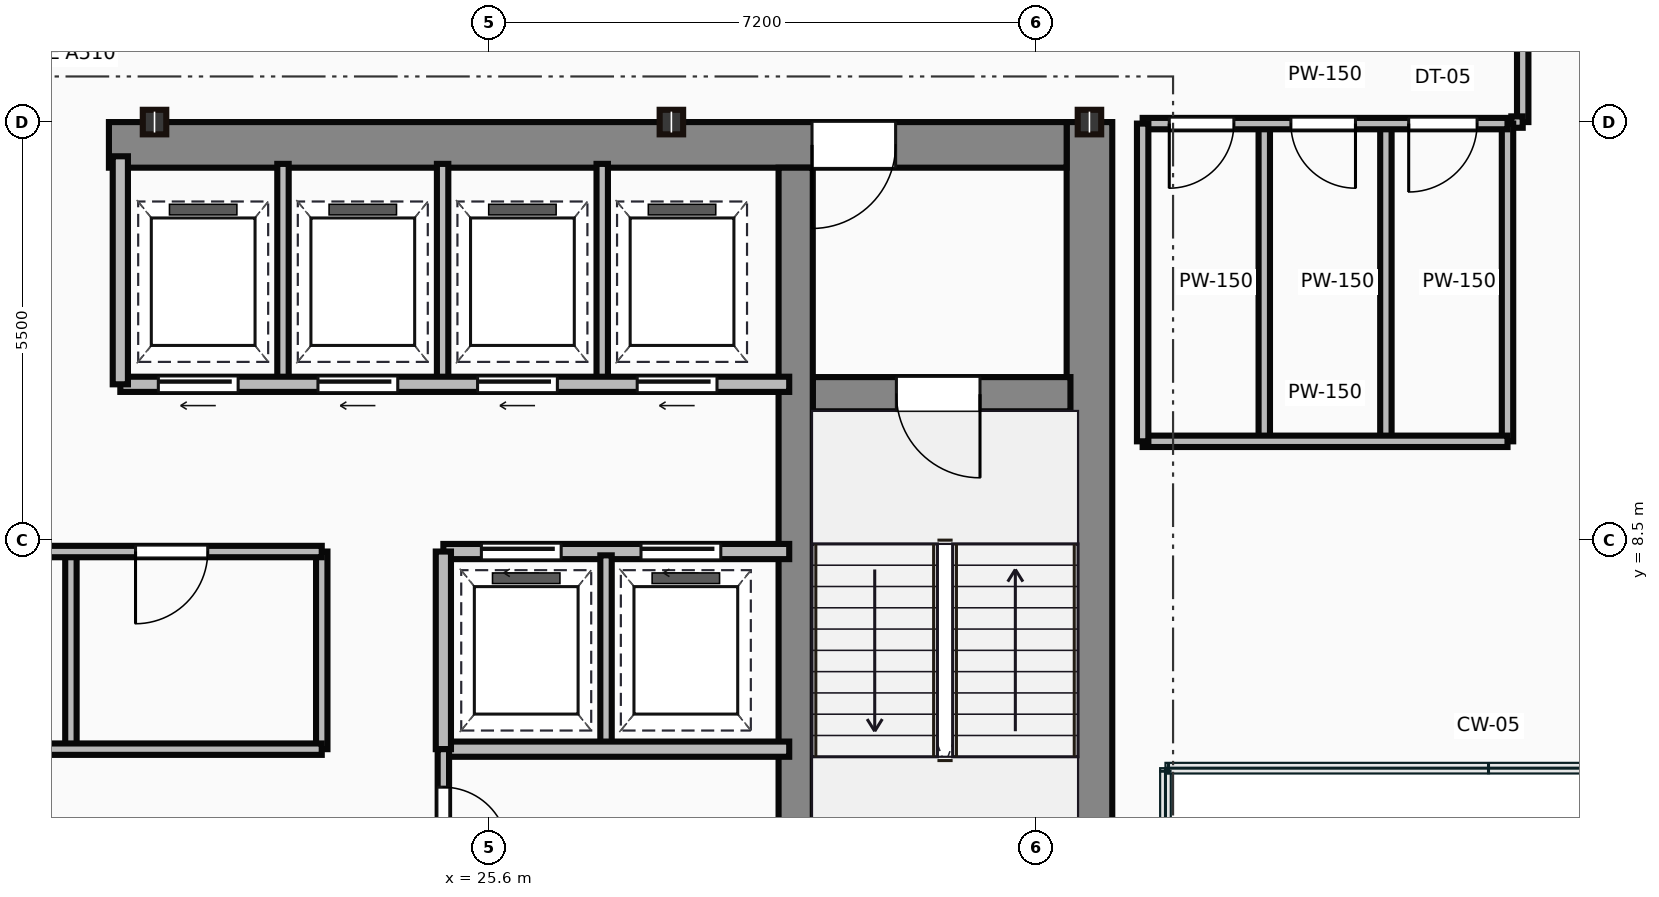
"""IFC4 building model, lengths in metres.
Left out: names, types, materials, properties, quantities, classifications, styles, units other than length and angle.
Written with IfcOpenShell. Run it as: python <this file> out.ifc"""

import sys

from ifc_helpers import new_model, si_unit, direction, frame, frame_2d, origin, origin_2d, place, context, subcontext, project, spatial, rectangle, i_section, extrude, source, transform, mapped, element, fill, save


model = new_model("IFC4")
c1 = context("Model", 3, precision=1e-05, world=origin(), true_north=direction((0.0, 1.0)))
c2 = subcontext(c1, "Body", "Model", "MODEL_VIEW")
j1 = project(units=[si_unit("LENGTHUNIT", "METRE"), si_unit("PLANEANGLEUNIT", "RADIAN")], contexts=[c1])
p1 = place(None, origin())
s1 = spatial("IfcSite", under=j1, at=p1, CompositionType="ELEMENT")
p2 = place(p1, origin())
s2 = spatial("IfcBuilding", under=s1, at=p2, CompositionType="ELEMENT")
p3 = place(p2, frame((0.0, 0.0, 244.2)))
s3 = spatial("IfcBuildingStorey", under=s2, at=p3, CompositionType="ELEMENT", Elevation=244.2)
m1 = source(origin(), c2, "Body", "SweptSolid", [
    extrude(rectangle(XDim=13.1, YDim=0.6, at=frame_2d((6.55, 0.0))), origin(), (0.0, 0.0, 1.0), 3.65),
])
p4 = place(p3, frame((33.5, 0.9, 0.0), z_axis=(0.0, 0.0, 1.0), x_axis=(0.0, 1.0, 0.0)))
e1 = element("IfcWall", 1, at=p4, inside=s3, PredefinedType="SHEAR", context=c2, shape_type="MappedRepresentation", body=[
    mapped(m1, transform((0.0, 0.0, 0.0))),
])
m2 = source(origin(), c2, "Body", "SweptSolid", [
    extrude(rectangle(XDim=12.6, YDim=0.6, at=frame_2d((6.3, 0.0))), origin(), (0.0, 0.0, 1.0), 3.65),
])
p5 = place(p3, frame((20.6, 13.7, 0.0), z_axis=(0.0, 0.0, 1.0), x_axis=(1.0, 0.0, 0.0)))
e2 = element("IfcWall", 2, at=p5, inside=s3, PredefinedType="SHEAR", context=c2, shape_type="MappedRepresentation", body=[
    mapped(m2, transform((0.0, 0.0, 0.0))),
])
p6 = place(p5, frame((9.25, 0.0, 0.0)))
e3 = element("IfcOpeningElement", 3, at=p6, cuts=e2, PredefinedType="OPENING", context=c2, shape_type="SweptSolid", body=[
    extrude(rectangle(XDim=1.1, YDim=2.15, at=frame_2d((0.55, 1.075))), frame((0.0, 0.31, 0.0), z_axis=(0.0, -1.0, 0.0), x_axis=(1.0, 0.0, 0.0)), (0.0, 0.0, 1.0), 0.62),
])
m3 = source(origin(), c2, "Body", "SweptSolid", [
    extrude(rectangle(XDim=12.5, YDim=0.45, at=frame_2d((6.25, 0.0))), origin(), (0.0, 0.0, 1.0), 3.65),
])
p7 = place(p3, frame((29.635, 0.9, 0.0), z_axis=(0.0, 0.0, 1.0), x_axis=(0.0, 1.0, 0.0)))
e4 = element("IfcWall", 4, at=p7, inside=s3, PredefinedType="SHEAR", context=c2, shape_type="MappedRepresentation", body=[
    mapped(m3, transform((0.0, 0.0, 0.0))),
])
m4 = source(origin(), c2, "Body", "SweptSolid", [
    extrude(rectangle(XDim=3.39, YDim=0.45, at=frame_2d((1.695, 0.0))), origin(), (0.0, 0.0, 1.0), 3.65),
])
p8 = place(p3, frame((29.86, 10.42, 0.0), z_axis=(0.0, 0.0, 1.0), x_axis=(1.0, 0.0, 0.0)))
e5 = element("IfcWall", 5, at=p8, inside=s3, PredefinedType="SHEAR", context=c2, shape_type="MappedRepresentation", body=[
    mapped(m4, transform((0.0, 0.0, 0.0))),
])
p9 = place(p8, frame((1.1, 0.0, 0.0)))
e6 = element("IfcOpeningElement", 6, at=p9, cuts=e5, PredefinedType="OPENING", context=c2, shape_type="SweptSolid", body=[
    extrude(rectangle(XDim=1.1, YDim=2.15, at=frame_2d((0.55, 1.075))), frame((0.0, 0.235, 0.0), z_axis=(0.0, -1.0, 0.0), x_axis=(1.0, 0.0, 0.0)), (0.0, 0.0, 1.0), 0.47),
])
m5 = source(origin(), c2, "Body", "SweptSolid", [
    extrude(i_section(OverallWidth=0.309, OverallDepth=0.323, WebThickness=0.014, FlangeThickness=0.023, at=origin_2d()), origin(), (0.0, 0.0, 1.0), 3.65),
])
for number, where, z_axis, x_axis in (
    (7, (21.2, 14.0, 0.0), (0.0, 0.0, 1.0), (1.0, 0.0, 0.0)),
    (8, (28.0, 14.0, 0.0), (0.0, 0.0, 1.0), (1.0, 0.0, 0.0)),
    (9, (33.5, 14.0, 0.0), (0.0, 0.0, 1.0), (1.0, 0.0, 0.0)),
):
    element("IfcColumn", number, at=place(p3, frame(where, z_axis=z_axis, x_axis=x_axis)), inside=s3, PredefinedType="COLUMN", context=c2, shape_type="MappedRepresentation", body=[
        mapped(m5, transform((0.0, 0.0, 0.0))),
    ])
m6 = source(origin(), c2, "Body", "SweptSolid", [
    extrude(rectangle(XDim=11.85, YDim=0.15, at=frame_2d((5.925, 0.0))), origin(), (0.0, 0.0, 1.0), 3.4),
])
p10 = place(p3, frame((11.55, 5.75, 0.0), z_axis=(0.0, 0.0, 1.0), x_axis=(1.0, 0.0, 0.0)))
e10 = element("IfcWall", 10, at=p10, inside=s3, PredefinedType="PARTITIONING", context=c2, shape_type="MappedRepresentation", body=[
    mapped(m6, transform((0.0, 0.0, 0.0))),
])
p11 = place(p3, frame((11.55, 8.35, 0.0), z_axis=(0.0, 0.0, 1.0), x_axis=(1.0, 0.0, 0.0)))
e11 = element("IfcWall", 11, at=p11, inside=s3, PredefinedType="PARTITIONING", context=c2, shape_type="MappedRepresentation", body=[
    mapped(m6, transform((0.0, 0.0, 0.0))),
])
p12 = place(p11, frame((1.1, 0.0, 0.0)))
e12 = element("IfcOpeningElement", 12, at=p12, cuts=e11, PredefinedType="OPENING", context=c2, shape_type="SweptSolid", body=[
    extrude(rectangle(XDim=0.95, YDim=2.15, at=frame_2d((0.475, 1.075))), frame((0.0, 0.085, 0.0), z_axis=(0.0, -1.0, 0.0), x_axis=(1.0, 0.0, 0.0)), (0.0, 0.0, 1.0), 0.17),
])
p13 = place(p11, frame((9.4, 0.0, 0.0)))
e13 = element("IfcOpeningElement", 13, at=p13, cuts=e11, PredefinedType="OPENING", context=c2, shape_type="SweptSolid", body=[
    extrude(rectangle(XDim=0.95, YDim=2.15, at=frame_2d((0.475, 1.075))), frame((0.0, 0.085, 0.0), z_axis=(0.0, -1.0, 0.0), x_axis=(1.0, 0.0, 0.0)), (0.0, 0.0, 1.0), 0.17),
])
m7 = source(origin(), c2, "Body", "SweptSolid", [
    extrude(rectangle(XDim=2.6, YDim=0.15, at=frame_2d((1.3, 0.0))), origin(), (0.0, 0.0, 1.0), 3.4),
])
p14 = place(p3, frame((23.4, 5.75, 0.0), z_axis=(0.0, 0.0, 1.0), x_axis=(0.0, 1.0, 0.0)))
e14 = element("IfcWall", 14, at=p14, inside=s3, PredefinedType="PARTITIONING", context=c2, shape_type="MappedRepresentation", body=[
    mapped(m7, transform((0.0, 0.0, 0.0))),
])
m8 = source(origin(), c2, "Body", "SweptSolid", [
    extrude(rectangle(XDim=2.5, YDim=0.15, at=frame_2d((1.25, 0.0))), origin(), (0.0, 0.0, 1.0), 3.4),
])
p15 = place(p3, frame((20.1, 5.8, 0.0), z_axis=(0.0, 0.0, 1.0), x_axis=(0.0, 1.0, 0.0)))
e15 = element("IfcWall", 15, at=p15, inside=s3, PredefinedType="PARTITIONING", context=c2, shape_type="MappedRepresentation", body=[
    mapped(m8, transform((0.0, 0.0, 0.0))),
])
m9 = source(origin(), c2, "Body", "SweptSolid", [
    extrude(rectangle(XDim=8.8, YDim=0.2, at=frame_2d((4.4, 0.0))), origin(), (0.0, 0.0, 1.0), 3.4),
])
p16 = place(p3, frame((20.75, 10.55, 0.0), z_axis=(0.0, 0.0, 1.0), x_axis=(1.0, 0.0, 0.0)))
e16 = element("IfcWall", 16, at=p16, inside=s3, PredefinedType="PARTITIONING", context=c2, shape_type="MappedRepresentation", body=[
    mapped(m9, transform((0.0, 0.0, 0.0))),
])
p17 = place(p16, frame((0.5, 0.0, 0.0)))
e17 = element("IfcOpeningElement", 17, at=p17, cuts=e16, PredefinedType="OPENING", context=c2, shape_type="SweptSolid", body=[
    extrude(rectangle(XDim=1.05, YDim=2.15, at=frame_2d((0.525, 1.075))), frame((0.0, 0.11, 0.0), z_axis=(0.0, -1.0, 0.0), x_axis=(1.0, 0.0, 0.0)), (0.0, 0.0, 1.0), 0.22),
])
p18 = place(p16, frame((2.6, 0.0, 0.0)))
e18 = element("IfcOpeningElement", 18, at=p18, cuts=e16, PredefinedType="OPENING", context=c2, shape_type="SweptSolid", body=[
    extrude(rectangle(XDim=1.05, YDim=2.15, at=frame_2d((0.525, 1.075))), frame((0.0, 0.11, 0.0), z_axis=(0.0, -1.0, 0.0), x_axis=(1.0, 0.0, 0.0)), (0.0, 0.0, 1.0), 0.22),
])
p19 = place(p16, frame((4.7, 0.0, 0.0)))
e19 = element("IfcOpeningElement", 19, at=p19, cuts=e16, PredefinedType="OPENING", context=c2, shape_type="SweptSolid", body=[
    extrude(rectangle(XDim=1.05, YDim=2.15, at=frame_2d((0.525, 1.075))), frame((0.0, 0.11, 0.0), z_axis=(0.0, -1.0, 0.0), x_axis=(1.0, 0.0, 0.0)), (0.0, 0.0, 1.0), 0.22),
])
p20 = place(p16, frame((6.8, 0.0, 0.0)))
e20 = element("IfcOpeningElement", 20, at=p20, cuts=e16, PredefinedType="OPENING", context=c2, shape_type="SweptSolid", body=[
    extrude(rectangle(XDim=1.05, YDim=2.15, at=frame_2d((0.525, 1.075))), frame((0.0, 0.11, 0.0), z_axis=(0.0, -1.0, 0.0), x_axis=(1.0, 0.0, 0.0)), (0.0, 0.0, 1.0), 0.22),
])
m10 = source(origin(), c2, "Body", "SweptSolid", [
    extrude(rectangle(XDim=3.0, YDim=0.2, at=frame_2d((1.5, 0.0))), origin(), (0.0, 0.0, 1.0), 3.4),
])
p21 = place(p3, frame((20.75, 10.55, 0.0), z_axis=(0.0, 0.0, 1.0), x_axis=(0.0, 1.0, 0.0)))
e21 = element("IfcWall", 21, at=p21, inside=s3, PredefinedType="PARTITIONING", context=c2, shape_type="MappedRepresentation", body=[
    mapped(m10, transform((0.0, 0.0, 0.0))),
])
m11 = source(origin(), c2, "Body", "SweptSolid", [
    extrude(rectangle(XDim=2.85, YDim=0.15, at=frame_2d((1.425, 0.0))), origin(), (0.0, 0.0, 1.0), 3.4),
])
for number, where, z_axis, x_axis in (
    (22, (22.89, 10.6, 0.0), (0.0, 0.0, 1.0), (0.0, 1.0, 0.0)),
    (23, (24.99, 10.6, 0.0), (0.0, 0.0, 1.0), (0.0, 1.0, 0.0)),
    (24, (27.09, 10.6, 0.0), (0.0, 0.0, 1.0), (0.0, 1.0, 0.0)),
):
    element("IfcWall", number, at=place(p3, frame(where, z_axis=z_axis, x_axis=x_axis)), inside=s3, PredefinedType="PARTITIONING", context=c2, shape_type="MappedRepresentation", body=[
        mapped(m11, transform((0.0, 0.0, 0.0))),
    ])
m12 = source(origin(), c2, "Body", "SweptSolid", [
    extrude(rectangle(XDim=4.55, YDim=0.2, at=frame_2d((2.275, 0.0))), origin(), (0.0, 0.0, 1.0), 3.4),
])
p22 = place(p3, frame((25.0, 8.35, 0.0), z_axis=(0.0, 0.0, 1.0), x_axis=(1.0, 0.0, 0.0)))
e25 = element("IfcWall", 25, at=p22, inside=s3, PredefinedType="PARTITIONING", context=c2, shape_type="MappedRepresentation", body=[
    mapped(m12, transform((0.0, 0.0, 0.0))),
])
p23 = place(p22, frame((0.5, 0.0, 0.0)))
e26 = element("IfcOpeningElement", 26, at=p23, cuts=e25, PredefinedType="OPENING", context=c2, shape_type="SweptSolid", body=[
    extrude(rectangle(XDim=1.05, YDim=2.15, at=frame_2d((0.525, 1.075))), frame((0.0, 0.11, 0.0), z_axis=(0.0, -1.0, 0.0), x_axis=(1.0, 0.0, 0.0)), (0.0, 0.0, 1.0), 0.22),
])
p24 = place(p22, frame((2.6, 0.0, 0.0)))
e27 = element("IfcOpeningElement", 27, at=p24, cuts=e25, PredefinedType="OPENING", context=c2, shape_type="SweptSolid", body=[
    extrude(rectangle(XDim=1.05, YDim=2.15, at=frame_2d((0.525, 1.075))), frame((0.0, 0.11, 0.0), z_axis=(0.0, -1.0, 0.0), x_axis=(1.0, 0.0, 0.0)), (0.0, 0.0, 1.0), 0.22),
])
p25 = place(p3, frame((25.0, 5.75, 0.0), z_axis=(0.0, 0.0, 1.0), x_axis=(1.0, 0.0, 0.0)))
e28 = element("IfcWall", 28, at=p25, inside=s3, PredefinedType="PARTITIONING", context=c2, shape_type="MappedRepresentation", body=[
    mapped(m12, transform((0.0, 0.0, 0.0))),
])
m13 = source(origin(), c2, "Body", "SweptSolid", [
    extrude(rectangle(XDim=2.6, YDim=0.2, at=frame_2d((1.3, 0.0))), origin(), (0.0, 0.0, 1.0), 3.4),
])
p26 = place(p3, frame((25.0, 5.75, 0.0), z_axis=(0.0, 0.0, 1.0), x_axis=(0.0, 1.0, 0.0)))
e29 = element("IfcWall", 29, at=p26, inside=s3, PredefinedType="PARTITIONING", context=c2, shape_type="MappedRepresentation", body=[
    mapped(m13, transform((0.0, 0.0, 0.0))),
])
p27 = place(p3, frame((27.14, 5.8, 0.0), z_axis=(0.0, 0.0, 1.0), x_axis=(0.0, 1.0, 0.0)))
e30 = element("IfcWall", 30, at=p27, inside=s3, PredefinedType="PARTITIONING", context=c2, shape_type="MappedRepresentation", body=[
    mapped(m8, transform((0.0, 0.0, 0.0))),
])
m14 = source(origin(), c2, "Body", "SweptSolid", [
    extrude(rectangle(XDim=4.9, YDim=0.15, at=frame_2d((2.45, 0.0))), origin(), (0.0, 0.0, 1.0), 3.4),
])
p28 = place(p3, frame((25.0, 0.85, 0.0), z_axis=(0.0, 0.0, 1.0), x_axis=(0.0, 1.0, 0.0)))
e31 = element("IfcWall", 31, at=p28, inside=s3, PredefinedType="PARTITIONING", context=c2, shape_type="MappedRepresentation", body=[
    mapped(m14, transform((0.0, 0.0, 0.0))),
])
p29 = place(p28, frame((1.85, 0.0, 0.0)))
e32 = element("IfcOpeningElement", 32, at=p29, cuts=e31, PredefinedType="OPENING", context=c2, shape_type="SweptSolid", body=[
    extrude(rectangle(XDim=0.95, YDim=2.15, at=frame_2d((0.475, 1.075))), frame((0.0, 0.085, 0.0), z_axis=(0.0, -1.0, 0.0), x_axis=(1.0, 0.0, 0.0)), (0.0, 0.0, 1.0), 0.17),
])
p30 = place(p28, frame((3.55, 0.0, 0.0)))
e33 = element("IfcOpeningElement", 33, at=p30, cuts=e31, PredefinedType="OPENING", context=c2, shape_type="SweptSolid", body=[
    extrude(rectangle(XDim=0.85, YDim=2.15, at=frame_2d((0.425, 1.075))), frame((0.0, 0.085, 0.0), z_axis=(0.0, -1.0, 0.0), x_axis=(1.0, 0.0, 0.0)), (0.0, 0.0, 1.0), 0.17),
])
m15 = source(origin(), c2, "Body", "SweptSolid", [
    extrude(rectangle(XDim=4.8, YDim=0.15, at=frame_2d((2.4, 0.0))), origin(), (0.0, 0.0, 1.0), 2.787),
])
p31 = place(p3, frame((34.2, 13.98, 0.0), z_axis=(0.0, 0.0, 1.0), x_axis=(1.0, 0.0, 0.0)))
e34 = element("IfcWall", 34, at=p31, inside=s3, PredefinedType="PARTITIONING", context=c2, shape_type="MappedRepresentation", body=[
    mapped(m15, transform((0.0, 0.0, 0.0))),
])
p32 = place(p31, frame((0.35, 0.0, 0.0)))
e35 = element("IfcOpeningElement", 35, at=p32, cuts=e34, PredefinedType="OPENING", context=c2, shape_type="SweptSolid", body=[
    extrude(rectangle(XDim=0.85, YDim=2.1, at=frame_2d((0.425, 1.05))), frame((0.0, 0.085, 0.0), z_axis=(0.0, -1.0, 0.0), x_axis=(1.0, 0.0, 0.0)), (0.0, 0.0, 1.0), 0.17),
])
p33 = place(p31, frame((1.95, 0.0, 0.0)))
e36 = element("IfcOpeningElement", 36, at=p33, cuts=e34, PredefinedType="OPENING", context=c2, shape_type="SweptSolid", body=[
    extrude(rectangle(XDim=0.85, YDim=2.1, at=frame_2d((0.425, 1.05))), frame((0.0, 0.085, 0.0), z_axis=(0.0, -1.0, 0.0), x_axis=(1.0, 0.0, 0.0)), (0.0, 0.0, 1.0), 0.17),
])
p34 = place(p31, frame((3.5, 0.0, 0.0)))
e37 = element("IfcOpeningElement", 37, at=p34, cuts=e34, PredefinedType="OPENING", context=c2, shape_type="SweptSolid", body=[
    extrude(rectangle(XDim=0.9, YDim=2.1, at=frame_2d((0.45, 1.05))), frame((0.0, 0.085, 0.0), z_axis=(0.0, -1.0, 0.0), x_axis=(1.0, 0.0, 0.0)), (0.0, 0.0, 1.0), 0.17),
])
m16 = source(origin(), c2, "Body", "SweptSolid", [
    extrude(rectangle(XDim=4.8, YDim=0.15, at=frame_2d((2.4, 0.0))), origin(), (0.0, 0.0, 1.0), 3.4),
])
p35 = place(p3, frame((34.2, 9.8, 0.0), z_axis=(0.0, 0.0, 1.0), x_axis=(1.0, 0.0, 0.0)))
e38 = element("IfcWall", 38, at=p35, inside=s3, PredefinedType="PARTITIONING", context=c2, shape_type="MappedRepresentation", body=[
    mapped(m16, transform((0.0, 0.0, 0.0))),
])
m17 = source(origin(), c2, "Body", "SweptSolid", [
    extrude(rectangle(XDim=4.18, YDim=0.15, at=frame_2d((2.09, 0.0))), origin(), (0.0, 0.0, 1.0), 3.4),
])
for number, where, z_axis, x_axis in (
    (39, (39.0, 9.8, 0.0), (0.0, 0.0, 1.0), (0.0, 1.0, 0.0)),
    (40, (34.2, 9.8, 0.0), (0.0, 0.0, 1.0), (0.0, 1.0, 0.0)),
    (41, (35.8, 9.8, 0.0), (0.0, 0.0, 1.0), (0.0, 1.0, 0.0)),
    (42, (37.4, 9.8, 0.0), (0.0, 0.0, 1.0), (0.0, 1.0, 0.0)),
):
    element("IfcWall", number, at=place(p3, frame(where, z_axis=z_axis, x_axis=x_axis)), inside=s3, PredefinedType="PARTITIONING", context=c2, shape_type="MappedRepresentation", body=[
        mapped(m17, transform((0.0, 0.0, 0.0))),
    ])
m18 = source(origin(), c2, "Body", "SweptSolid", [
    extrude(rectangle(XDim=2.2, YDim=0.15, at=frame_2d((1.1, 0.0))), origin(), (0.0, 0.0, 1.0), 3.4),
])
p36 = place(p3, frame((39.2, 16.2, 0.0), z_axis=(0.0, 0.0, 1.0), x_axis=(0.0, -1.0, 0.0)))
e43 = element("IfcWall", 43, at=p36, inside=s3, PredefinedType="PARTITIONING", context=c2, shape_type="MappedRepresentation", body=[
    mapped(m18, transform((0.0, 0.0, 0.0))),
])
m19 = source(origin(), c2, "Body", "SweptSolid", [
    extrude(rectangle(XDim=0.15, YDim=0.15, at=frame_2d((0.075, 0.0))), origin(), (0.0, 0.0, 1.0), 3.4),
])
p37 = place(p3, frame((39.2, 14.0, 0.0), z_axis=(0.0, 0.0, 1.0), x_axis=(-1.0, 0.0, 0.0)))
e44 = element("IfcWall", 44, at=p37, inside=s3, PredefinedType="PARTITIONING", context=c2, shape_type="MappedRepresentation", body=[
    mapped(m19, transform((0.0, 0.0, 0.0))),
])
m20 = source(origin(), c2, "Body", "SweptSolid", [
    extrude(rectangle(XDim=1.1, YDim=2.15, at=frame_2d((0.55, 1.075))), frame((0.0, 0.025, 0.0), z_axis=(0.0, -1.0, 0.0), x_axis=(1.0, 0.0, 0.0)), (0.0, 0.0, 1.0), 0.05),
])
p38 = place(p9, frame((1.1, 0.0, 0.0), z_axis=(0.0, 0.0, 1.0), x_axis=(-1.0, 0.0, 0.0)))
e45 = element("IfcDoor", 45, at=p38, inside=s3, OperationType="SINGLE_SWING_RIGHT", PredefinedType="DOOR", context=c2, shape_type="MappedRepresentation", body=[
    mapped(m20, transform((0.0, 0.0, 0.0))),
])
fill(e6, e45)
p39 = place(p6, origin())
e46 = element("IfcDoor", 46, at=p39, inside=s3, OperationType="SINGLE_SWING_LEFT", PredefinedType="DOOR", context=c2, shape_type="MappedRepresentation", body=[
    mapped(m20, transform((0.0, 0.0, 0.0))),
])
fill(e3, e46)
m21 = source(origin(), c2, "Body", "SweptSolid", [
    extrude(rectangle(XDim=0.95, YDim=2.15, at=frame_2d((0.475, 1.075))), frame((0.0, 0.025, 0.0), z_axis=(0.0, -1.0, 0.0), x_axis=(1.0, 0.0, 0.0)), (0.0, 0.0, 1.0), 0.05),
])
p40 = place(p13, origin())
e47 = element("IfcDoor", 47, at=p40, inside=s3, OperationType="SINGLE_SWING_LEFT", PredefinedType="DOOR", context=c2, shape_type="MappedRepresentation", body=[
    mapped(m21, transform((0.0, 0.0, 0.0))),
])
fill(e13, e47)
m22 = source(origin(), c2, "Body", "SweptSolid", [
    extrude(rectangle(XDim=1.05, YDim=2.15, at=frame_2d((0.525, 1.075))), frame((0.0, 0.025, 0.0), z_axis=(0.0, -1.0, 0.0), x_axis=(1.0, 0.0, 0.0)), (0.0, 0.0, 1.0), 0.05),
])
p41 = place(p17, frame((1.05, 0.0, 0.0), z_axis=(0.0, 0.0, 1.0), x_axis=(-1.0, 0.0, 0.0)))
e48 = element("IfcDoor", 48, at=p41, inside=s3, OperationType="SLIDING_TO_LEFT", PredefinedType="DOOR", context=c2, shape_type="MappedRepresentation", body=[
    mapped(m22, transform((0.0, 0.0, 0.0))),
])
fill(e17, e48)
p42 = place(p18, frame((1.05, 0.0, 0.0), z_axis=(0.0, 0.0, 1.0), x_axis=(-1.0, 0.0, 0.0)))
e49 = element("IfcDoor", 49, at=p42, inside=s3, OperationType="SLIDING_TO_LEFT", PredefinedType="DOOR", context=c2, shape_type="MappedRepresentation", body=[
    mapped(m22, transform((0.0, 0.0, 0.0))),
])
fill(e18, e49)
p43 = place(p19, frame((1.05, 0.0, 0.0), z_axis=(0.0, 0.0, 1.0), x_axis=(-1.0, 0.0, 0.0)))
e50 = element("IfcDoor", 50, at=p43, inside=s3, OperationType="SLIDING_TO_LEFT", PredefinedType="DOOR", context=c2, shape_type="MappedRepresentation", body=[
    mapped(m22, transform((0.0, 0.0, 0.0))),
])
fill(e19, e50)
p44 = place(p20, frame((1.05, 0.0, 0.0), z_axis=(0.0, 0.0, 1.0), x_axis=(-1.0, 0.0, 0.0)))
e51 = element("IfcDoor", 51, at=p44, inside=s3, OperationType="SLIDING_TO_LEFT", PredefinedType="DOOR", context=c2, shape_type="MappedRepresentation", body=[
    mapped(m22, transform((0.0, 0.0, 0.0))),
])
fill(e20, e51)
p45 = place(p23, origin())
e52 = element("IfcDoor", 52, at=p45, inside=s3, OperationType="SLIDING_TO_LEFT", PredefinedType="DOOR", context=c2, shape_type="MappedRepresentation", body=[
    mapped(m22, transform((0.0, 0.0, 0.0))),
])
fill(e26, e52)
p46 = place(p24, origin())
e53 = element("IfcDoor", 53, at=p46, inside=s3, OperationType="SLIDING_TO_LEFT", PredefinedType="DOOR", context=c2, shape_type="MappedRepresentation", body=[
    mapped(m22, transform((0.0, 0.0, 0.0))),
])
fill(e27, e53)
m23 = source(origin(), c2, "Body", "SweptSolid", [
    extrude(rectangle(XDim=0.85, YDim=2.15, at=frame_2d((0.425, 1.075))), frame((0.0, 0.025, 0.0), z_axis=(0.0, -1.0, 0.0), x_axis=(1.0, 0.0, 0.0)), (0.0, 0.0, 1.0), 0.05),
])
p47 = place(p30, origin())
e54 = element("IfcDoor", 54, at=p47, inside=s3, OperationType="SINGLE_SWING_LEFT", PredefinedType="DOOR", context=c2, shape_type="MappedRepresentation", body=[
    mapped(m23, transform((0.0, 0.0, 0.0))),
])
fill(e33, e54)
m24 = source(origin(), c2, "Body", "SweptSolid", [
    extrude(rectangle(XDim=0.85, YDim=2.1, at=frame_2d((0.425, 1.05))), frame((0.0, 0.025, 0.0), z_axis=(0.0, -1.0, 0.0), x_axis=(1.0, 0.0, 0.0)), (0.0, 0.0, 1.0), 0.05),
])
p48 = place(p32, frame((0.85, 0.0, 0.0), z_axis=(0.0, 0.0, 1.0), x_axis=(-1.0, 0.0, 0.0)))
e55 = element("IfcDoor", 55, at=p48, inside=s3, OperationType="SINGLE_SWING_LEFT", PredefinedType="DOOR", context=c2, shape_type="MappedRepresentation", body=[
    mapped(m24, transform((0.0, 0.0, 0.0))),
])
fill(e35, e55)
p49 = place(p33, frame((0.85, 0.0, 0.0), z_axis=(0.0, 0.0, 1.0), x_axis=(-1.0, 0.0, 0.0)))
e56 = element("IfcDoor", 56, at=p49, inside=s3, OperationType="SINGLE_SWING_RIGHT", PredefinedType="DOOR", context=c2, shape_type="MappedRepresentation", body=[
    mapped(m24, transform((0.0, 0.0, 0.0))),
])
fill(e36, e56)
m25 = source(origin(), c2, "Body", "SweptSolid", [
    extrude(rectangle(XDim=0.9, YDim=2.1, at=frame_2d((0.45, 1.05))), frame((0.0, 0.025, 0.0), z_axis=(0.0, -1.0, 0.0), x_axis=(1.0, 0.0, 0.0)), (0.0, 0.0, 1.0), 0.05),
])
p50 = place(p34, frame((0.9, 0.0, 0.0), z_axis=(0.0, 0.0, 1.0), x_axis=(-1.0, 0.0, 0.0)))
e57 = element("IfcDoor", 57, at=p50, inside=s3, OperationType="SINGLE_SWING_LEFT", PredefinedType="DOOR", context=c2, shape_type="MappedRepresentation", body=[
    mapped(m25, transform((0.0, 0.0, 0.0))),
])
fill(e37, e57)
save(model, sys.argv[1])
